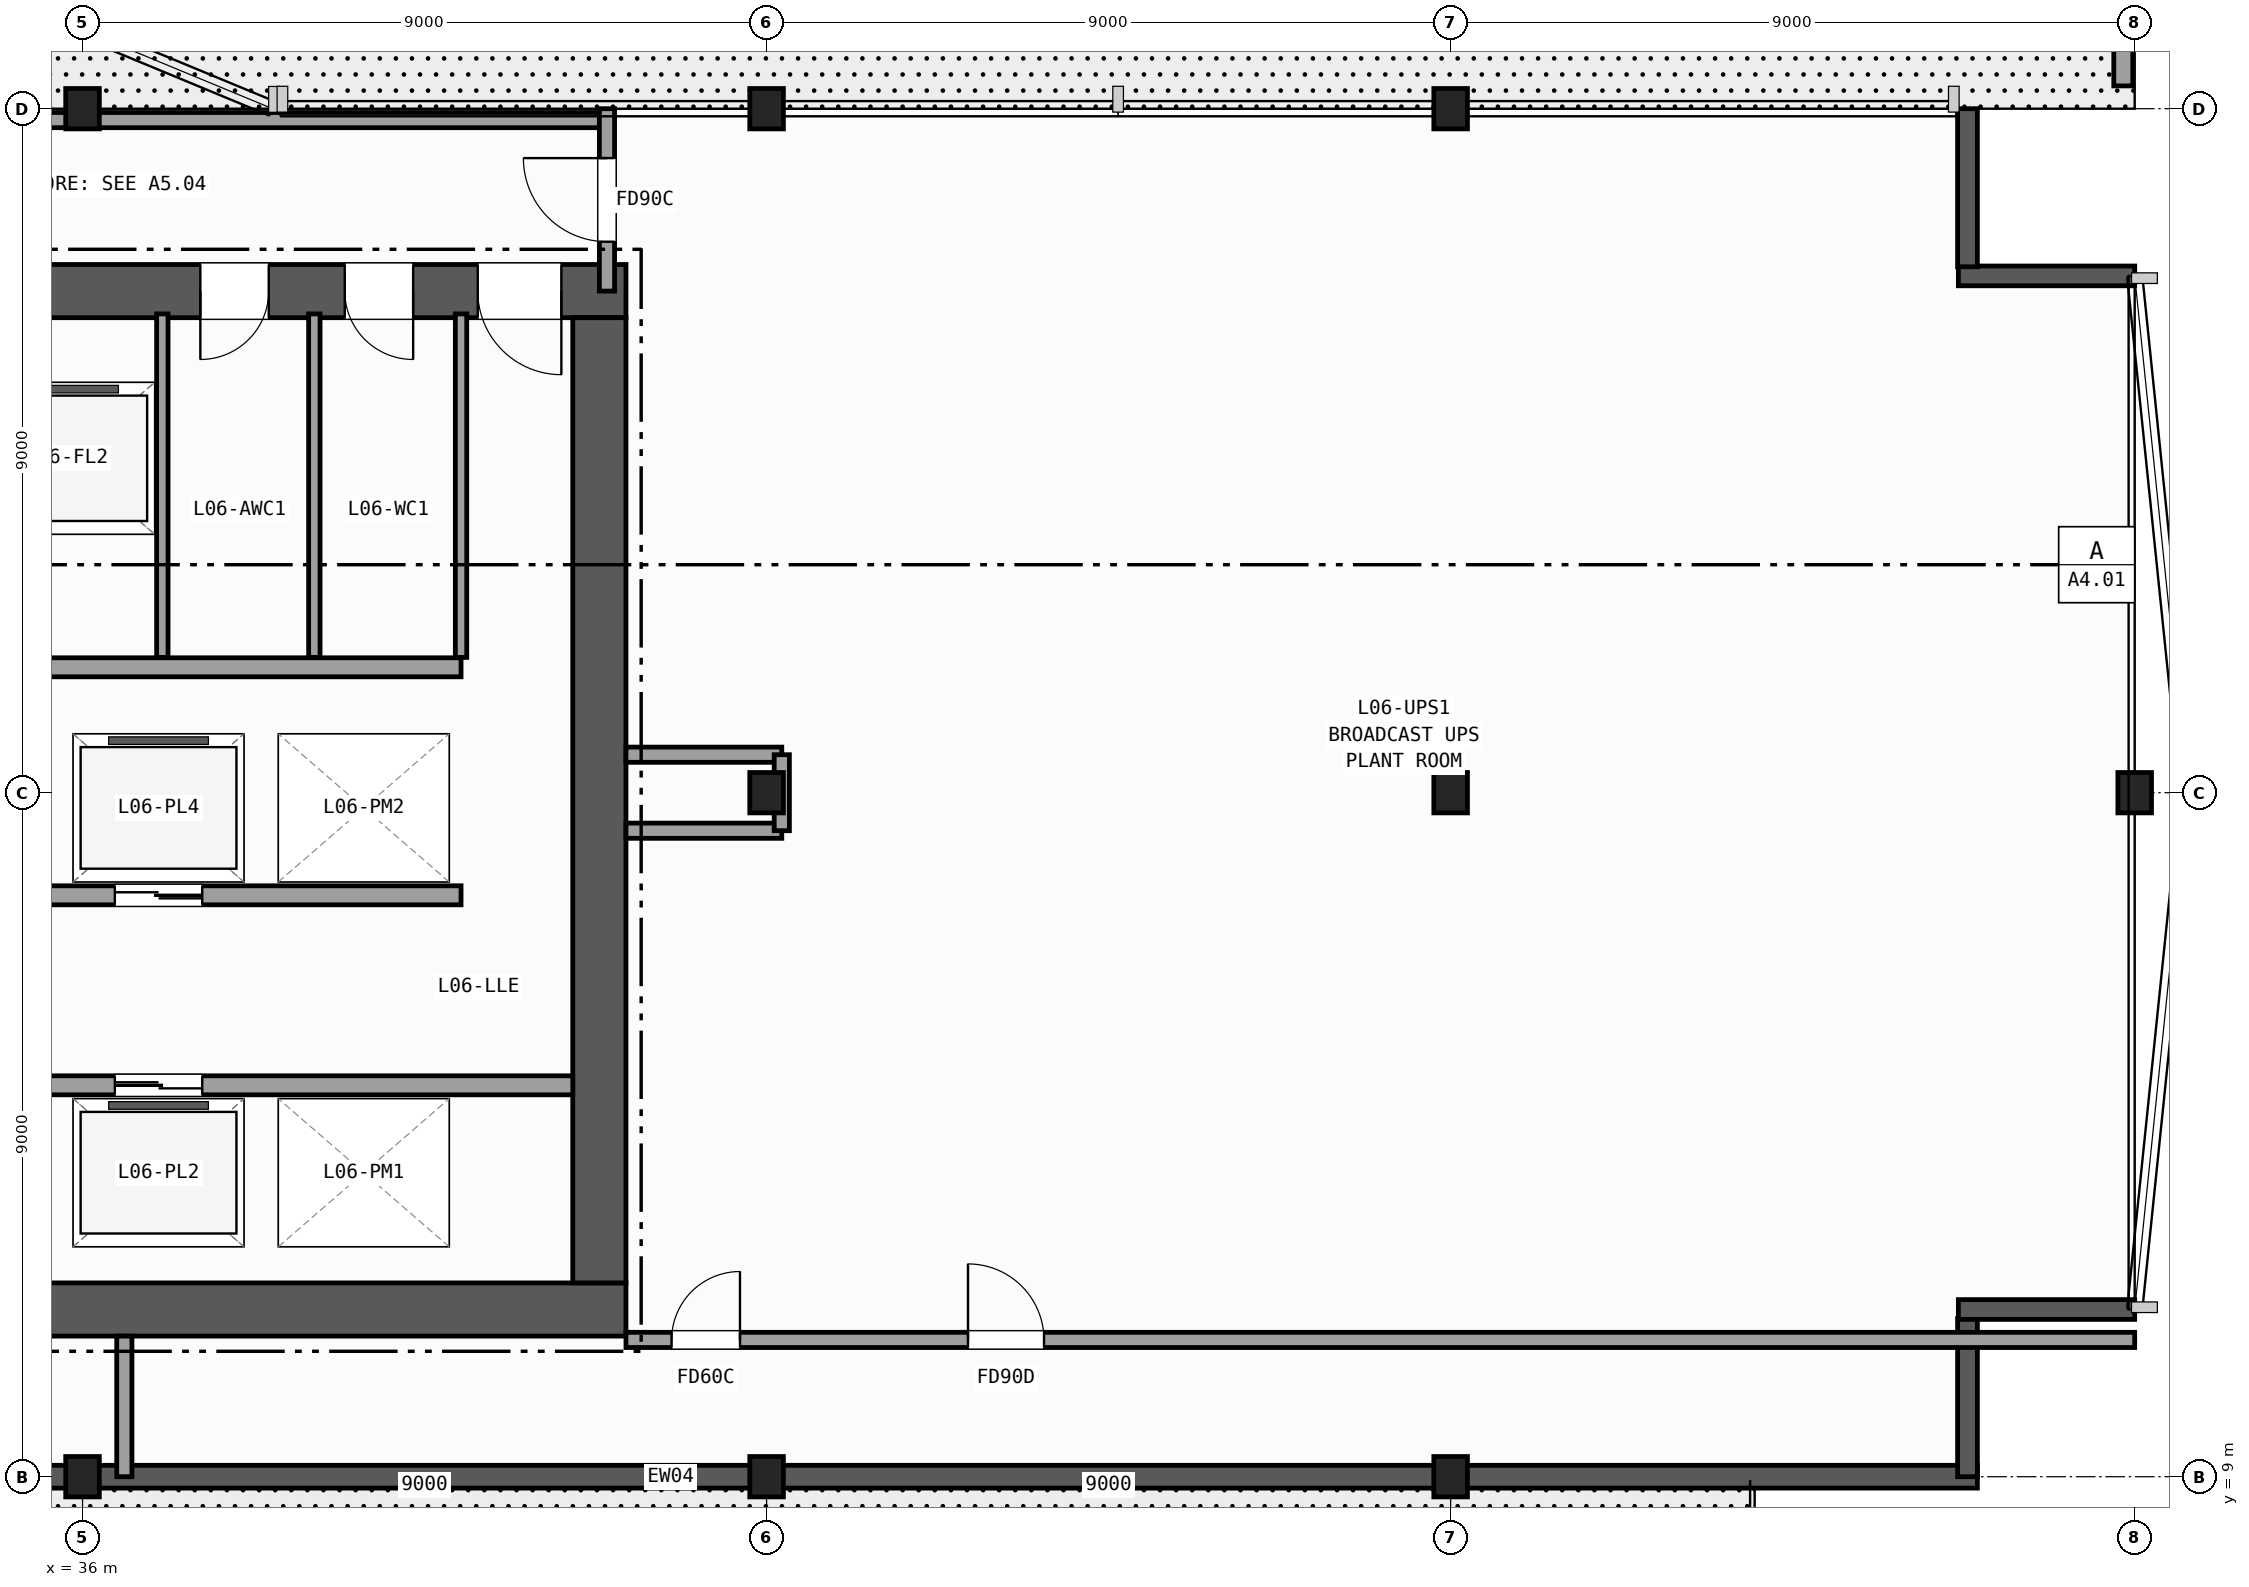
"""IFC4 building model, lengths in metres.
Left out: names, types, materials, properties, quantities, classifications, styles, units other than length and angle.
Written with IfcOpenShell. Run it as: python <this file> out.ifc"""

import sys

from ifc_helpers import new_model, si_unit, direction, frame, frame_2d, origin, origin_2d, place, context, subcontext, project, spatial, rectangle, i_section, extrude, element, fill, save


model = new_model("IFC4")
c1 = context("Model", 3, precision=1e-05, world=origin(), true_north=direction((0.0, 1.0)))
c2 = subcontext(c1, "Body", "Model", "MODEL_VIEW")
j1 = project(units=[si_unit("LENGTHUNIT", "METRE"), si_unit("PLANEANGLEUNIT", "RADIAN")], contexts=[c1])
p1 = place(None, origin())
s1 = spatial("IfcSite", under=j1, at=p1, CompositionType="ELEMENT")
p2 = place(p1, origin())
s2 = spatial("IfcBuilding", under=s1, at=p2, CompositionType="ELEMENT")
p3 = place(p2, frame((0.0, 0.0, 30.8)))
s3 = spatial("IfcBuildingStorey", under=s2, at=p3, CompositionType="ELEMENT", Elevation=30.8)
for number, where, z_axis, x_axis in (
    (1, (36.0, 9.0, 0.0), (0.0, 0.0, 1.0), (1.0, 0.0, 0.0)),
    (2, (36.0, 27.0, 0.0), (0.0, 0.0, 1.0), (1.0, 0.0, 0.0)),
    (3, (45.0, 9.0, 0.0), (0.0, 0.0, 1.0), (1.0, 0.0, 0.0)),
    (4, (45.0, 18.0, 0.0), (0.0, 0.0, 1.0), (1.0, 0.0, 0.0)),
    (5, (45.0, 27.0, 0.0), (0.0, 0.0, 1.0), (1.0, 0.0, 0.0)),
    (6, (54.0, 9.0, 0.0), (0.0, 0.0, 1.0), (1.0, 0.0, 0.0)),
    (7, (54.0, 18.0, 0.0), (0.0, 0.0, 1.0), (1.0, 0.0, 0.0)),
    (8, (54.0, 27.0, 0.0), (0.0, 0.0, 1.0), (1.0, 0.0, 0.0)),
    (9, (63.0, 18.0, 0.0), (0.0, 0.0, 1.0), (1.0, 0.0, 0.0)),
):
    element("IfcColumn", number, at=place(p3, frame(where, z_axis=z_axis, x_axis=x_axis)), inside=s3, PredefinedType="COLUMN", context=c2, shape_type="SweptSolid", body=[
        extrude(i_section(OverallWidth=0.442, OverallDepth=0.531, WebThickness=0.066, FlangeThickness=0.106, FilletRadius=0.015, at=origin_2d()), origin(), (0.0, 0.0, 1.0), 5.2),
    ])
p4 = place(p3, frame((60.93, 9.0, 0.0), z_axis=(0.0, 0.0, 1.0), x_axis=(-1.0, 0.0, 0.0)))
e10 = element("IfcWall", 10, at=p4, inside=s3, PredefinedType="SOLIDWALL", context=c2, shape_type="SweptSolid", body=[
    extrude(rectangle(XDim=37.13, YDim=0.3, at=frame_2d((18.565, 0.0))), origin(), (0.0, 0.0, 1.0), 4.92),
])
p5 = place(p4, frame((34.68, 0.0, 0.0)))
e11 = element("IfcOpeningElement", 11, at=p5, cuts=e10, PredefinedType="OPENING", context=c2, shape_type="SweptSolid", body=[
    extrude(rectangle(XDim=1.4, YDim=2.25, at=frame_2d((0.7, 1.125))), frame((0.0, 0.16, 0.0), z_axis=(0.0, -1.0, 0.0), x_axis=(1.0, 0.0, 0.0)), (0.0, 0.0, 1.0), 0.32),
])
p6 = place(p3, frame((60.8, 9.0, 0.0), z_axis=(0.0, 0.0, 1.0), x_axis=(0.0, 1.0, 0.0)))
e12 = element("IfcWall", 12, at=p6, inside=s3, PredefinedType="SOLIDWALL", context=c2, shape_type="SweptSolid", body=[
    extrude(rectangle(XDim=2.08, YDim=0.26, at=frame_2d((1.04, 0.0))), origin(), (0.0, 0.0, 1.0), 4.92),
])
for number, where, z_axis, x_axis in (
    (13, (60.68, 11.2, 0.0), (0.0, 0.0, 1.0), (1.0, 0.0, 0.0)),
    (14, (63.0, 24.8, 0.0), (0.0, 0.0, 1.0), (-1.0, 0.0, 0.0)),
):
    element("IfcWall", number, at=place(p3, frame(where, z_axis=z_axis, x_axis=x_axis)), inside=s3, PredefinedType="SOLIDWALL", context=c2, shape_type="SweptSolid", body=[
        extrude(rectangle(XDim=2.32, YDim=0.26, at=frame_2d((1.16, 0.0))), origin(), (0.0, 0.0, 1.0), 4.92),
    ])
p7 = place(p3, frame((60.8, 24.92, 0.0), z_axis=(0.0, 0.0, 1.0), x_axis=(0.0, 1.0, 0.0)))
e15 = element("IfcWall", 15, at=p7, inside=s3, PredefinedType="SOLIDWALL", context=c2, shape_type="SweptSolid", body=[
    extrude(rectangle(XDim=2.08, YDim=0.26, at=frame_2d((1.04, 0.0))), origin(), (0.0, 0.0, 1.0), 4.92),
])
p8 = place(p3, frame((62.85, 53.6, 0.0), z_axis=(0.0, 0.0, 1.0), x_axis=(0.0, -1.0, 0.0)))
e16 = element("IfcWall", 16, at=p8, inside=s3, PredefinedType="PARAPET", context=c2, shape_type="SweptSolid", body=[
    extrude(rectangle(XDim=26.3, YDim=0.25, at=frame_2d((13.15, 0.0))), origin(), (0.0, 0.0, 1.0), 1.2),
])
p9 = place(p3, frame((29.05, 11.2, 0.0), z_axis=(0.0, 0.0, 1.0), x_axis=(1.0, 0.0, 0.0)))
e17 = element("IfcWall", 17, at=p9, inside=s3, PredefinedType="SHEAR", context=c2, shape_type="SweptSolid", body=[
    extrude(rectangle(XDim=14.1, YDim=0.7, at=frame_2d((7.05, 0.0))), origin(), (0.0, 0.0, 1.0), 4.92),
])
p10 = place(p3, frame((43.15, 24.6, 0.0), z_axis=(0.0, 0.0, 1.0), x_axis=(-1.0, 0.0, 0.0)))
e18 = element("IfcWall", 18, at=p10, inside=s3, PredefinedType="SHEAR", context=c2, shape_type="SweptSolid", body=[
    extrude(rectangle(XDim=14.1, YDim=0.7, at=frame_2d((7.05, 0.0))), origin(), (0.0, 0.0, 1.0), 4.92),
])
p11 = place(p10, frame((0.85, 0.0, 0.0)))
e19 = element("IfcOpeningElement", 19, at=p11, cuts=e18, PredefinedType="OPENING", context=c2, shape_type="SweptSolid", body=[
    extrude(rectangle(XDim=1.1, YDim=2.15, at=frame_2d((0.55, 1.075))), frame((0.0, 0.36, 0.0), z_axis=(0.0, -1.0, 0.0), x_axis=(1.0, 0.0, 0.0)), (0.0, 0.0, 1.0), 0.72),
])
p12 = place(p10, frame((2.8, 0.0, 0.0)))
e20 = element("IfcOpeningElement", 20, at=p12, cuts=e18, PredefinedType="OPENING", context=c2, shape_type="SweptSolid", body=[
    extrude(rectangle(XDim=0.9, YDim=2.1, at=frame_2d((0.45, 1.05))), frame((0.0, 0.36, 0.0), z_axis=(0.0, -1.0, 0.0), x_axis=(1.0, 0.0, 0.0)), (0.0, 0.0, 1.0), 0.72),
])
p13 = place(p10, frame((4.7, 0.0, 0.0)))
e21 = element("IfcOpeningElement", 21, at=p13, cuts=e18, PredefinedType="OPENING", context=c2, shape_type="SweptSolid", body=[
    extrude(rectangle(XDim=0.9, YDim=2.1, at=frame_2d((0.45, 1.05))), frame((0.0, 0.36, 0.0), z_axis=(0.0, -1.0, 0.0), x_axis=(1.0, 0.0, 0.0)), (0.0, 0.0, 1.0), 0.72),
])
p14 = place(p3, frame((42.8, 11.55, 0.0), z_axis=(0.0, 0.0, 1.0), x_axis=(0.0, 1.0, 0.0)))
e22 = element("IfcWall", 22, at=p14, inside=s3, PredefinedType="SHEAR", context=c2, shape_type="SweptSolid", body=[
    extrude(rectangle(XDim=12.7, YDim=0.7, at=frame_2d((6.35, 0.0))), origin(), (0.0, 0.0, 1.0), 4.92),
])
p15 = place(p3, frame((34.5, 19.65, 0.0), z_axis=(0.0, 0.0, 1.0), x_axis=(1.0, 0.0, 0.0)))
e23 = element("IfcWall", 23, at=p15, inside=s3, PredefinedType="PARTITIONING", context=c2, shape_type="SweptSolid", body=[
    extrude(rectangle(XDim=6.48, YDim=0.25, at=frame_2d((3.24, 0.0))), origin(), (0.0, 0.0, 1.0), 4.92),
])
p16 = place(p3, frame((33.07, 14.15, 0.0), z_axis=(0.0, 0.0, 1.0), x_axis=(1.0, 0.0, 0.0)))
e24 = element("IfcWall", 24, at=p16, inside=s3, PredefinedType="PARTITIONING", context=c2, shape_type="SweptSolid", body=[
    extrude(rectangle(XDim=9.38, YDim=0.25, at=frame_2d((4.69, 0.0))), origin(), (0.0, 0.0, 1.0), 4.92),
])
p17 = place(p16, frame((0.755, 0.0, 0.0)))
e25 = element("IfcOpeningElement", 25, at=p17, cuts=e24, PredefinedType="OPENING", context=c2, shape_type="SweptSolid", body=[
    extrude(rectangle(XDim=1.15, YDim=2.15, at=frame_2d((0.575, 1.075))), frame((0.0, 0.135, 0.0), z_axis=(0.0, -1.0, 0.0), x_axis=(1.0, 0.0, 0.0)), (0.0, 0.0, 1.0), 0.27),
])
p18 = place(p16, frame((3.355, 0.0, 0.0)))
e26 = element("IfcOpeningElement", 26, at=p18, cuts=e24, PredefinedType="OPENING", context=c2, shape_type="SweptSolid", body=[
    extrude(rectangle(XDim=1.15, YDim=2.15, at=frame_2d((0.575, 1.075))), frame((0.0, 0.135, 0.0), z_axis=(0.0, -1.0, 0.0), x_axis=(1.0, 0.0, 0.0)), (0.0, 0.0, 1.0), 0.27),
])
p19 = place(p3, frame((40.98, 16.65, 0.0), z_axis=(0.0, 0.0, 1.0), x_axis=(-1.0, 0.0, 0.0)))
e27 = element("IfcWall", 27, at=p19, inside=s3, PredefinedType="PARTITIONING", context=c2, shape_type="SweptSolid", body=[
    extrude(rectangle(XDim=7.91, YDim=0.25, at=frame_2d((3.955, 0.0))), origin(), (0.0, 0.0, 1.0), 4.92),
])
p20 = place(p19, frame((6.005, 0.0, 0.0)))
e28 = element("IfcOpeningElement", 28, at=p20, cuts=e27, PredefinedType="OPENING", context=c2, shape_type="SweptSolid", body=[
    extrude(rectangle(XDim=1.15, YDim=2.15, at=frame_2d((0.575, 1.075))), frame((0.0, 0.135, 0.0), z_axis=(0.0, -1.0, 0.0), x_axis=(1.0, 0.0, 0.0)), (0.0, 0.0, 1.0), 0.27),
])
p21 = place(p19, frame((3.405, 0.0, 0.0)))
e29 = element("IfcOpeningElement", 29, at=p21, cuts=e27, PredefinedType="OPENING", context=c2, shape_type="SweptSolid", body=[
    extrude(rectangle(XDim=1.15, YDim=2.15, at=frame_2d((0.575, 1.075))), frame((0.0, 0.135, 0.0), z_axis=(0.0, -1.0, 0.0), x_axis=(1.0, 0.0, 0.0)), (0.0, 0.0, 1.0), 0.27),
])
for number, where, z_axis, x_axis in (
    (30, (37.05, 19.78, 0.0), (0.0, 0.0, 1.0), (0.0, 1.0, 0.0)),
    (31, (39.05, 19.78, 0.0), (0.0, 0.0, 1.0), (0.0, 1.0, 0.0)),
    (32, (40.98, 19.78, 0.0), (0.0, 0.0, 1.0), (0.0, 1.0, 0.0)),
):
    element("IfcWall", number, at=place(p3, frame(where, z_axis=z_axis, x_axis=x_axis)), inside=s3, PredefinedType="PARTITIONING", context=c2, shape_type="SweptSolid", body=[
        extrude(rectangle(XDim=4.52, YDim=0.15, at=frame_2d((2.26, 0.0))), origin(), (0.0, 0.0, 1.0), 4.92),
    ])
p22 = place(p3, frame((43.15, 10.8, 0.0), z_axis=(0.0, 0.0, 1.0), x_axis=(1.0, 0.0, 0.0)))
e33 = element("IfcWall", 33, at=p22, inside=s3, PredefinedType="PARTITIONING", context=c2, shape_type="SweptSolid", body=[
    extrude(rectangle(XDim=19.85, YDim=0.2, at=frame_2d((9.925, 0.0))), origin(), (0.0, 0.0, 1.0), 4.045),
])
p23 = place(p22, frame((0.6, 0.0, 0.0)))
e34 = element("IfcOpeningElement", 34, at=p23, cuts=e33, PredefinedType="OPENING", context=c2, shape_type="SweptSolid", body=[
    extrude(rectangle(XDim=0.9, YDim=2.1, at=frame_2d((0.45, 1.05))), frame((0.0, 0.11, 0.0), z_axis=(0.0, -1.0, 0.0), x_axis=(1.0, 0.0, 0.0)), (0.0, 0.0, 1.0), 0.22),
])
p24 = place(p22, frame((4.5, 0.0, 0.0)))
e35 = element("IfcOpeningElement", 35, at=p24, cuts=e33, PredefinedType="OPENING", context=c2, shape_type="SweptSolid", body=[
    extrude(rectangle(XDim=1.0, YDim=2.15, at=frame_2d((0.5, 1.075))), frame((0.0, 0.11, 0.0), z_axis=(0.0, -1.0, 0.0), x_axis=(1.0, 0.0, 0.0)), (0.0, 0.0, 1.0), 0.22),
])
p25 = place(p3, frame((36.55, 9.0, 0.0), z_axis=(0.0, 0.0, 1.0), x_axis=(0.0, 1.0, 0.0)))
e36 = element("IfcWall", 36, at=p25, inside=s3, PredefinedType="PARTITIONING", context=c2, shape_type="SweptSolid", body=[
    extrude(rectangle(XDim=1.85, YDim=0.2, at=frame_2d((0.925, 0.0))), origin(), (0.0, 0.0, 1.0), 4.127),
])
p26 = place(p3, frame((29.25, 26.85, 0.0), z_axis=(0.0, 0.0, 1.0), x_axis=(1.0, 0.0, 0.0)))
e37 = element("IfcWall", 37, at=p26, inside=s3, PredefinedType="PARTITIONING", context=c2, shape_type="SweptSolid", body=[
    extrude(rectangle(XDim=13.55, YDim=0.2, at=frame_2d((6.775, 0.0))), origin(), (0.0, 0.0, 1.0), 3.973),
])
p27 = place(p3, frame((42.9, 24.6, 0.0), z_axis=(0.0, 0.0, 1.0), x_axis=(0.0, 1.0, 0.0)))
e38 = element("IfcWall", 38, at=p27, inside=s3, PredefinedType="PARTITIONING", context=c2, shape_type="SweptSolid", body=[
    extrude(rectangle(XDim=2.4, YDim=0.2, at=frame_2d((1.2, 0.0))), origin(), (0.0, 0.0, 1.0), 4.127),
])
p28 = place(p27, frame((0.65, 0.0, 0.0)))
e39 = element("IfcOpeningElement", 39, at=p28, cuts=e38, PredefinedType="OPENING", context=c2, shape_type="SweptSolid", body=[
    extrude(rectangle(XDim=1.1, YDim=2.15, at=frame_2d((0.55, 1.075))), frame((0.0, 0.11, 0.0), z_axis=(0.0, -1.0, 0.0), x_axis=(1.0, 0.0, 0.0)), (0.0, 0.0, 1.0), 0.22),
])
for number, where, z_axis, x_axis in (
    (40, (43.15, 18.5, 0.0), (0.0, 0.0, 1.0), (1.0, 0.0, 0.0)),
    (41, (43.15, 17.5, 0.0), (0.0, 0.0, 1.0), (1.0, 0.0, 0.0)),
):
    element("IfcWall", number, at=place(p3, frame(where, z_axis=z_axis, x_axis=x_axis)), inside=s3, PredefinedType="PARTITIONING", context=c2, shape_type="SweptSolid", body=[
        extrude(rectangle(XDim=2.05, YDim=0.2, at=frame_2d((1.025, 0.0))), origin(), (0.0, 0.0, 1.0), 4.045),
    ])
p29 = place(p3, frame((45.2, 17.5, 0.0), z_axis=(0.0, 0.0, 1.0), x_axis=(0.0, 1.0, 0.0)))
e42 = element("IfcWall", 42, at=p29, inside=s3, PredefinedType="PARTITIONING", context=c2, shape_type="SweptSolid", body=[
    extrude(rectangle(XDim=1.0, YDim=0.2, at=frame_2d((0.5, 0.0))), origin(), (0.0, 0.0, 1.0), 3.973),
])
p30 = place(p11, origin())
e43 = element("IfcDoor", 43, at=p30, inside=s3, OperationType="SINGLE_SWING_LEFT", PredefinedType="DOOR", context=c2, shape_type="SweptSolid", body=[
    extrude(rectangle(XDim=1.1, YDim=2.15, at=frame_2d((0.55, 1.075))), frame((0.0, 0.025, 0.0), z_axis=(0.0, -1.0, 0.0), x_axis=(1.0, 0.0, 0.0)), (0.0, 0.0, 1.0), 0.05),
])
fill(e19, e43)
p31 = place(p12, origin())
e44 = element("IfcDoor", 44, at=p31, inside=s3, OperationType="SINGLE_SWING_LEFT", PredefinedType="DOOR", context=c2, shape_type="SweptSolid", body=[
    extrude(rectangle(XDim=0.9, YDim=2.1, at=frame_2d((0.45, 1.05))), frame((0.0, 0.025, 0.0), z_axis=(0.0, -1.0, 0.0), x_axis=(1.0, 0.0, 0.0)), (0.0, 0.0, 1.0), 0.05),
])
fill(e20, e44)
p32 = place(p13, origin())
e45 = element("IfcDoor", 45, at=p32, inside=s3, OperationType="SINGLE_SWING_RIGHT", PredefinedType="DOOR", context=c2, shape_type="SweptSolid", body=[
    extrude(rectangle(XDim=0.9, YDim=2.1, at=frame_2d((0.45, 1.05))), frame((0.0, 0.025, 0.0), z_axis=(0.0, -1.0, 0.0), x_axis=(1.0, 0.0, 0.0)), (0.0, 0.0, 1.0), 0.05),
])
fill(e21, e45)
p33 = place(p18, origin())
e46 = element("IfcDoor", 46, at=p33, inside=s3, OperationType="DOUBLE_DOOR_SLIDING", PredefinedType="DOOR", context=c2, shape_type="SweptSolid", body=[
    extrude(rectangle(XDim=1.15, YDim=2.15, at=frame_2d((0.575, 1.075))), frame((0.0, 0.025, 0.0), z_axis=(0.0, -1.0, 0.0), x_axis=(1.0, 0.0, 0.0)), (0.0, 0.0, 1.0), 0.05),
])
fill(e26, e46)
p34 = place(p21, origin())
e47 = element("IfcDoor", 47, at=p34, inside=s3, OperationType="DOUBLE_DOOR_SLIDING", PredefinedType="DOOR", context=c2, shape_type="SweptSolid", body=[
    extrude(rectangle(XDim=1.15, YDim=2.15, at=frame_2d((0.575, 1.075))), frame((0.0, 0.025, 0.0), z_axis=(0.0, -1.0, 0.0), x_axis=(1.0, 0.0, 0.0)), (0.0, 0.0, 1.0), 0.05),
])
fill(e29, e47)
p35 = place(p23, origin())
e48 = element("IfcDoor", 48, at=p35, inside=s3, OperationType="SINGLE_SWING_RIGHT", PredefinedType="DOOR", context=c2, shape_type="SweptSolid", body=[
    extrude(rectangle(XDim=0.9, YDim=2.1, at=frame_2d((0.45, 1.05))), frame((0.0, 0.025, 0.0), z_axis=(0.0, -1.0, 0.0), x_axis=(1.0, 0.0, 0.0)), (0.0, 0.0, 1.0), 0.05),
])
fill(e34, e48)
p36 = place(p28, origin())
e49 = element("IfcDoor", 49, at=p36, inside=s3, OperationType="SINGLE_SWING_RIGHT", PredefinedType="DOOR", context=c2, shape_type="SweptSolid", body=[
    extrude(rectangle(XDim=1.1, YDim=2.15, at=frame_2d((0.55, 1.075))), frame((0.0, 0.025, 0.0), z_axis=(0.0, -1.0, 0.0), x_axis=(1.0, 0.0, 0.0)), (0.0, 0.0, 1.0), 0.05),
])
fill(e39, e49)
p37 = place(p24, origin())
e50 = element("IfcDoor", 50, at=p37, inside=s3, OperationType="SINGLE_SWING_LEFT", PredefinedType="DOOR", context=c2, shape_type="SweptSolid", body=[
    extrude(rectangle(XDim=1.0, YDim=2.15, at=frame_2d((0.5, 1.075))), frame((0.0, 0.025, 0.0), z_axis=(0.0, -1.0, 0.0), x_axis=(1.0, 0.0, 0.0)), (0.0, 0.0, 1.0), 0.05),
])
fill(e35, e50)
save(model, sys.argv[1])
